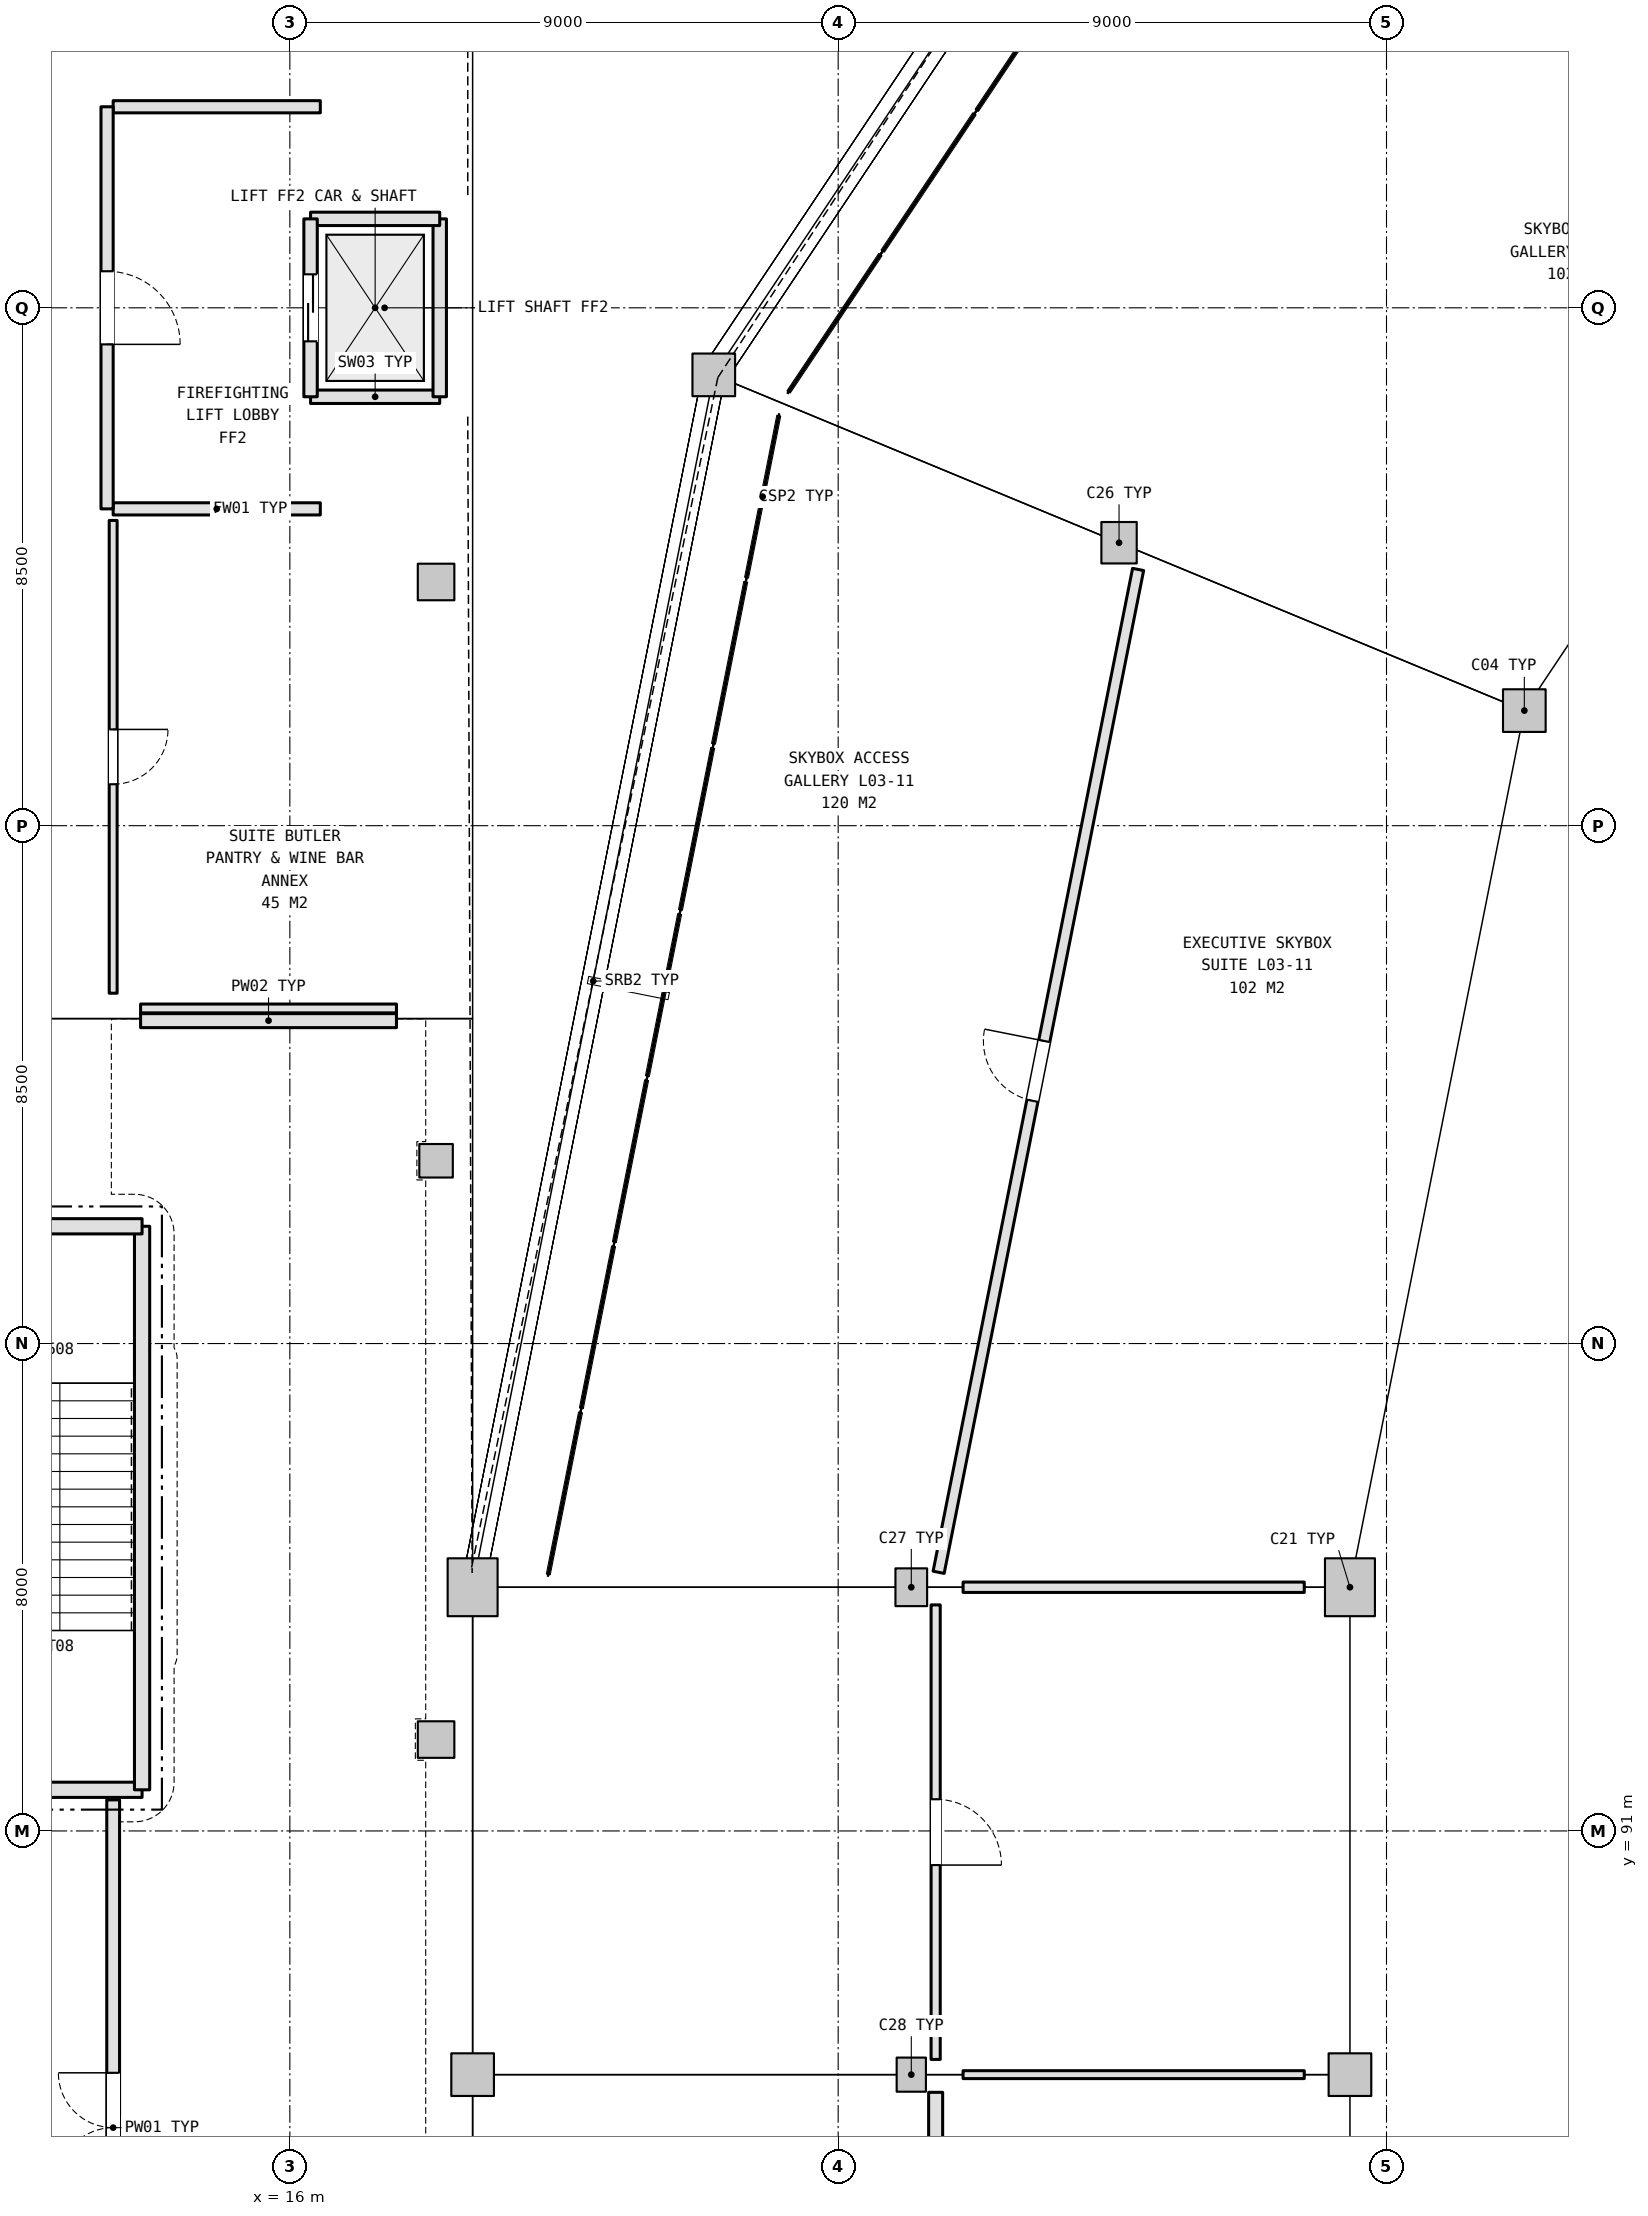
"""IFC4 building model, lengths in metres.
Left out: names, types, materials, properties, quantities, classifications, styles, units other than length and angle.
Written with IfcOpenShell. Run it as: python <this file> out.ifc"""

import sys

from ifc_helpers import new_model, si_unit, direction, frame, frame_2d, origin, origin_2d, place, context, subcontext, project, spatial, rectangle, extrude, element, fill, save


model = new_model("IFC4")
c1 = context("Model", 3, precision=1e-05, world=origin(), true_north=direction((0.0, 1.0)))
c2 = subcontext(c1, "Body", "Model", "MODEL_VIEW")
j1 = project(units=[si_unit("LENGTHUNIT", "METRE"), si_unit("PLANEANGLEUNIT", "RADIAN")], contexts=[c1])
p1 = place(None, origin())
s1 = spatial("IfcSite", under=j1, at=p1, CompositionType="ELEMENT")
p2 = place(p1, origin())
s2 = spatial("IfcBuilding", under=s1, at=p2, CompositionType="ELEMENT")
p3 = place(p2, frame((0.0, 0.0, 16.2)))
s3 = spatial("IfcBuildingStorey", under=s2, at=p3, CompositionType="ELEMENT", Elevation=16.2)
p4 = place(p3, frame((36.262, 109.389, 0.0), z_axis=(0.0, 0.0, 1.0), x_axis=(1.0, 0.0, 0.0)))
e1 = element("IfcColumn", 1, at=p4, inside=s3, PredefinedType="COLUMN", context=c2, shape_type="SweptSolid", body=[
    extrude(rectangle(XDim=0.7, YDim=0.7, at=origin_2d()), origin(), (0.0, 0.0, 1.0), 5.4),
])
p5 = place(p3, frame((29.61, 112.144, 0.0), z_axis=(0.0, 0.0, 1.0), x_axis=(1.0, 0.0, 0.0)))
e2 = element("IfcColumn", 2, at=p5, inside=s3, PredefinedType="COLUMN", context=c2, shape_type="SweptSolid", body=[
    extrude(rectangle(XDim=0.58, YDim=0.68, at=origin_2d()), origin(), (0.0, 0.0, 1.0), 5.4),
])
p6 = place(p3, frame((22.958, 114.9, 0.0), z_axis=(0.0, 0.0, 1.0), x_axis=(1.0, 0.0, 0.0)))
e3 = element("IfcColumn", 3, at=p6, inside=s3, PredefinedType="COLUMN", context=c2, shape_type="SweptSolid", body=[
    extrude(rectangle(XDim=0.7, YDim=0.7, at=origin_2d()), origin(), (0.0, 0.0, 1.0), 5.4),
])
p7 = place(p3, frame((33.4, 95.0, 0.0), z_axis=(0.0, 0.0, 1.0), x_axis=(1.0, 0.0, 0.0)))
e4 = element("IfcColumn", 4, at=p7, inside=s3, PredefinedType="COLUMN", context=c2, shape_type="SweptSolid", body=[
    extrude(rectangle(XDim=0.82, YDim=0.95, at=origin_2d()), origin(), (0.0, 0.0, 1.0), 5.4),
])
p8 = place(p3, frame((26.2, 95.0, 0.0), z_axis=(0.0, 0.0, 1.0), x_axis=(1.0, 0.0, 0.0)))
e5 = element("IfcColumn", 5, at=p8, inside=s3, PredefinedType="COLUMN", context=c2, shape_type="SweptSolid", body=[
    extrude(rectangle(XDim=0.52, YDim=0.62, at=origin_2d()), origin(), (0.0, 0.0, 1.0), 5.4),
])
p9 = place(p3, frame((19.0, 95.0, 0.0), z_axis=(0.0, 0.0, 1.0), x_axis=(1.0, 0.0, 0.0)))
e6 = element("IfcColumn", 6, at=p9, inside=s3, PredefinedType="COLUMN", context=c2, shape_type="SweptSolid", body=[
    extrude(rectangle(XDim=0.82, YDim=0.95, at=origin_2d()), origin(), (0.0, 0.0, 1.0), 5.4),
])
p10 = place(p3, frame((33.4, 87.0, 0.0), z_axis=(0.0, 0.0, 1.0), x_axis=(1.0, 0.0, 0.0)))
e7 = element("IfcColumn", 7, at=p10, inside=s3, PredefinedType="COLUMN", context=c2, shape_type="SweptSolid", body=[
    extrude(rectangle(XDim=0.7, YDim=0.7, at=origin_2d()), origin(), (0.0, 0.0, 1.0), 5.4),
])
p11 = place(p3, frame((26.2, 87.0, 0.0), z_axis=(0.0, 0.0, 1.0), x_axis=(1.0, 0.0, 0.0)))
e8 = element("IfcColumn", 8, at=p11, inside=s3, PredefinedType="COLUMN", context=c2, shape_type="SweptSolid", body=[
    extrude(rectangle(XDim=0.48, YDim=0.56, at=origin_2d()), origin(), (0.0, 0.0, 1.0), 5.4),
])
p12 = place(p3, frame((19.0, 87.0, 0.0), z_axis=(0.0, 0.0, 1.0), x_axis=(1.0, 0.0, 0.0)))
e9 = element("IfcColumn", 9, at=p12, inside=s3, PredefinedType="COLUMN", context=c2, shape_type="SweptSolid", body=[
    extrude(rectangle(XDim=0.7, YDim=0.7, at=origin_2d()), origin(), (0.0, 0.0, 1.0), 5.4),
])
p13 = place(p3, frame((18.4, 92.5, 0.0), z_axis=(0.0, 0.0, 1.0), x_axis=(1.0, 0.0, 0.0)))
e10 = element("IfcColumn", 10, at=p13, inside=s3, PredefinedType="COLUMN", context=c2, shape_type="SweptSolid", body=[
    extrude(rectangle(XDim=0.6, YDim=0.6, at=origin_2d()), origin(), (0.0, 0.0, 1.0), 5.4),
])
p14 = place(p3, frame((18.4, 102.0, 0.0), z_axis=(0.0, 0.0, 1.0), x_axis=(1.0, 0.0, 0.0)))
e11 = element("IfcColumn", 11, at=p14, inside=s3, PredefinedType="COLUMN", context=c2, shape_type="SweptSolid", body=[
    extrude(rectangle(XDim=0.55, YDim=0.55, at=origin_2d()), origin(), (0.0, 0.0, 1.0), 5.4),
])
p15 = place(p3, frame((18.4, 111.5, 0.0), z_axis=(0.0, 0.0, 1.0), x_axis=(1.0, 0.0, 0.0)))
e12 = element("IfcColumn", 12, at=p15, inside=s3, PredefinedType="COLUMN", context=c2, shape_type="SweptSolid", body=[
    extrude(rectangle(XDim=0.6, YDim=0.6, at=origin_2d()), origin(), (0.0, 0.0, 1.0), 5.4),
])
p16 = place(p3, frame((8.275, 91.675, 0.0), z_axis=(0.0, 0.0, 1.0), x_axis=(1.0, 0.0, 0.0)))
e13 = element("IfcWall", 13, at=p16, inside=s3, PredefinedType="SHEAR", context=c2, shape_type="SweptSolid", body=[
    extrude(rectangle(XDim=5.299, YDim=0.25, at=frame_2d((2.65, 0.0))), origin(), (0.0, 0.0, 1.0), 5.14),
])
p17 = place(p3, frame((13.575, 91.675, 0.0), z_axis=(0.0, 0.0, 1.0), x_axis=(0.0, 1.0, 0.0)))
e14 = element("IfcWall", 14, at=p17, inside=s3, PredefinedType="SHEAR", context=c2, shape_type="SweptSolid", body=[
    extrude(rectangle(XDim=9.249, YDim=0.25, at=frame_2d((4.625, 0.0))), origin(), (0.0, 0.0, 1.0), 5.14),
])
p18 = place(p3, frame((13.575, 100.925, 0.0), z_axis=(0.0, 0.0, 1.0), x_axis=(-1.0, 0.0, 0.0)))
e15 = element("IfcWall", 15, at=p18, inside=s3, PredefinedType="SHEAR", context=c2, shape_type="SweptSolid", body=[
    extrude(rectangle(XDim=5.299, YDim=0.25, at=frame_2d((2.65, 0.0))), origin(), (0.0, 0.0, 1.0), 5.14),
])
p19 = place(p18, frame((1.9, 0.0, 0.0)))
e16 = element("IfcOpeningElement", 16, at=p19, cuts=e15, PredefinedType="OPENING", context=c2, shape_type="SweptSolid", body=[
    extrude(rectangle(XDim=1.5, YDim=2.2, at=frame_2d((0.75, 1.1))), frame((0.0, 0.135, 0.0), z_axis=(0.0, -1.0, 0.0), x_axis=(1.0, 0.0, 0.0)), (0.0, 0.0, 1.0), 0.27),
])
p20 = place(p3, frame((16.34, 114.54, 0.0), z_axis=(0.0, 0.0, 1.0), x_axis=(1.0, 0.0, 0.0)))
e17 = element("IfcWall", 17, at=p20, inside=s3, PredefinedType="SHEAR", context=c2, shape_type="SweptSolid", body=[
    extrude(rectangle(XDim=2.12, YDim=0.22, at=frame_2d((1.06, 0.0))), origin(), (0.0, 0.0, 1.0), 5.14),
])
p21 = place(p3, frame((18.46, 114.54, 0.0), z_axis=(0.0, 0.0, 1.0), x_axis=(0.0, 1.0, 0.0)))
e18 = element("IfcWall", 18, at=p21, inside=s3, PredefinedType="SHEAR", context=c2, shape_type="SweptSolid", body=[
    extrude(rectangle(XDim=2.92, YDim=0.22, at=frame_2d((1.46, 0.0))), origin(), (0.0, 0.0, 1.0), 5.14),
])
p22 = place(p3, frame((18.46, 117.46, 0.0), z_axis=(0.0, 0.0, 1.0), x_axis=(-1.0, 0.0, 0.0)))
e19 = element("IfcWall", 19, at=p22, inside=s3, PredefinedType="SHEAR", context=c2, shape_type="SweptSolid", body=[
    extrude(rectangle(XDim=2.12, YDim=0.22, at=frame_2d((1.06, 0.0))), origin(), (0.0, 0.0, 1.0), 5.14),
])
p23 = place(p3, frame((16.34, 117.46, 0.0), z_axis=(0.0, 0.0, 1.0), x_axis=(0.0, -1.0, 0.0)))
e20 = element("IfcWall", 20, at=p23, inside=s3, PredefinedType="SHEAR", context=c2, shape_type="SweptSolid", body=[
    extrude(rectangle(XDim=2.92, YDim=0.22, at=frame_2d((1.46, 0.0))), origin(), (0.0, 0.0, 1.0), 5.14),
])
p24 = place(p23, frame((0.91, 0.0, 0.0)))
e21 = element("IfcOpeningElement", 21, at=p24, cuts=e20, PredefinedType="OPENING", context=c2, shape_type="SweptSolid", body=[
    extrude(rectangle(XDim=1.1, YDim=2.2, at=frame_2d((0.55, 1.1))), frame((0.0, 0.12, 0.0), z_axis=(0.0, -1.0, 0.0), x_axis=(1.0, 0.0, 0.0)), (0.0, 0.0, 1.0), 0.24),
])
for number, where, z_axis, x_axis in (
    (22, (13.1, 112.7, 0.0), (0.0, 0.0, 1.0), (1.0, 0.0, 0.0)),
    (23, (16.5, 119.3, 0.0), (0.0, 0.0, 1.0), (-1.0, 0.0, 0.0)),
):
    element("IfcWall", number, at=place(p3, frame(where, z_axis=z_axis, x_axis=x_axis)), inside=s3, PredefinedType="SOLIDWALL", context=c2, shape_type="SweptSolid", body=[
        extrude(rectangle(XDim=3.4, YDim=0.2, at=frame_2d((1.7, 0.0))), origin(), (0.0, 0.0, 1.0), 5.12),
    ])
p25 = place(p3, frame((13.0, 119.3, 0.0), z_axis=(0.0, 0.0, 1.0), x_axis=(0.0, -1.0, 0.0)))
e24 = element("IfcWall", 24, at=p25, inside=s3, PredefinedType="SOLIDWALL", context=c2, shape_type="SweptSolid", body=[
    extrude(rectangle(XDim=6.6, YDim=0.2, at=frame_2d((3.3, 0.0))), origin(), (0.0, 0.0, 1.0), 5.12),
])
p26 = place(p25, frame((2.7, 0.0, 0.0)))
e25 = element("IfcOpeningElement", 25, at=p26, cuts=e24, PredefinedType="OPENING", context=c2, shape_type="SweptSolid", body=[
    extrude(rectangle(XDim=1.2, YDim=2.2, at=frame_2d((0.6, 1.1))), frame((0.0, 0.11, 0.0), z_axis=(0.0, -1.0, 0.0), x_axis=(1.0, 0.0, 0.0)), (0.0, 0.0, 1.0), 0.22),
])
p27 = place(p3, frame((13.1, 80.75, 0.0), z_axis=(0.0, 0.0, 1.0), x_axis=(0.0, 1.0, 0.0)))
e26 = element("IfcWall", 26, at=p27, inside=s3, PredefinedType="PLUMBINGWALL", context=c2, shape_type="SweptSolid", body=[
    extrude(rectangle(XDim=10.76, YDim=0.21, at=frame_2d((5.38, 0.0))), origin(), (0.0, 0.0, 1.0), 4.668),
])
p28 = place(p27, frame((4.48, 0.0, 0.0)))
e27 = element("IfcOpeningElement", 27, at=p28, cuts=e26, PredefinedType="OPENING", context=c2, shape_type="SweptSolid", body=[
    extrude(rectangle(XDim=1.8, YDim=2.2, at=frame_2d((0.9, 1.1))), frame((0.0, 0.115, 0.0), z_axis=(0.0, -1.0, 0.0), x_axis=(1.0, 0.0, 0.0)), (0.0, 0.0, 1.0), 0.23),
])
p29 = place(p3, frame((13.55, 104.3, 0.0), z_axis=(0.0, 0.0, 1.0), x_axis=(1.0, 0.0, 0.0)))
e28 = element("IfcWall", 28, at=p29, inside=s3, PredefinedType="PLUMBINGWALL", context=c2, shape_type="SweptSolid", body=[
    extrude(rectangle(XDim=4.2, YDim=0.23, at=frame_2d((2.1, 0.0))), origin(), (0.0, 0.0, 1.0), 5.12),
])
p30 = place(p3, frame((13.1, 104.75, 0.0), z_axis=(0.0, 0.0, 1.0), x_axis=(0.0, 1.0, 0.0)))
e29 = element("IfcWall", 29, at=p30, inside=s3, PredefinedType="PARTITIONING", context=c2, shape_type="SweptSolid", body=[
    extrude(rectangle(XDim=7.76, YDim=0.13, at=frame_2d((3.88, 0.0))), origin(), (0.0, 0.0, 1.0), 4.668),
])
p31 = place(p30, frame((3.43, 0.0, 0.0)))
e30 = element("IfcOpeningElement", 30, at=p31, cuts=e29, PredefinedType="OPENING", context=c2, shape_type="SweptSolid", body=[
    extrude(rectangle(XDim=0.9, YDim=2.1, at=frame_2d((0.45, 1.05))), frame((0.0, 0.075, 0.0), z_axis=(0.0, -1.0, 0.0), x_axis=(1.0, 0.0, 0.0)), (0.0, 0.0, 1.0), 0.15),
])
p32 = place(p3, frame((17.75, 104.5, 0.0), z_axis=(0.0, 0.0, 1.0), x_axis=(-1.0, 0.0, 0.0)))
e31 = element("IfcWall", 31, at=p32, inside=s3, PredefinedType="PARTITIONING", context=c2, shape_type="SweptSolid", body=[
    extrude(rectangle(XDim=4.2, YDim=0.145, at=frame_2d((2.1, 0.0))), origin(), (0.0, 0.0, 1.0), 5.12),
])
p33 = place(p3, frame((26.649, 95.245, 0.0), z_axis=(0.0, 0.0, 1.0), x_axis=(0.195100557291, 0.980783244425, 0.0)))
e32 = element("IfcWall", 32, at=p33, inside=s3, PredefinedType="PARTITIONING", context=c2, shape_type="SweptSolid", body=[
    extrude(rectangle(XDim=16.783, YDim=0.185, at=frame_2d((8.392, 0.0))), origin(), (0.0, 0.0, 1.0), 4.305),
])
p34 = place(p33, frame((7.892, 0.0, 0.0)))
e33 = element("IfcOpeningElement", 33, at=p34, cuts=e32, PredefinedType="OPENING", context=c2, shape_type="SweptSolid", body=[
    extrude(rectangle(XDim=1.0, YDim=2.1, at=frame_2d((0.5, 1.05))), frame((0.0, 0.103, 0.0), z_axis=(0.0, -1.0, 0.0), x_axis=(1.0, 0.0, 0.0)), (0.0, 0.0, 1.0), 0.205),
])
p35 = place(p3, frame((32.65, 95.0, 0.0), z_axis=(0.0, 0.0, 1.0), x_axis=(-1.0, 0.0, 0.0)))
e34 = element("IfcWall", 34, at=p35, inside=s3, PredefinedType="PARTITIONING", context=c2, shape_type="SweptSolid", body=[
    extrude(rectangle(XDim=5.6, YDim=0.17, at=frame_2d((2.8, 0.0))), origin(), (0.0, 0.0, 1.0), 4.345),
])
p36 = place(p3, frame((26.6, 87.25, 0.0), z_axis=(0.0, 0.0, 1.0), x_axis=(0.0, 1.0, 0.0)))
e35 = element("IfcWall", 35, at=p36, inside=s3, PredefinedType="PARTITIONING", context=c2, shape_type="SweptSolid", body=[
    extrude(rectangle(XDim=7.46, YDim=0.15, at=frame_2d((3.73, 0.0))), origin(), (0.0, 0.0, 1.0), 4.345),
])
p37 = place(p36, frame((3.19, 0.0, 0.0)))
e36 = element("IfcOpeningElement", 36, at=p37, cuts=e35, PredefinedType="OPENING", context=c2, shape_type="SweptSolid", body=[
    extrude(rectangle(XDim=1.08, YDim=2.25, at=frame_2d((0.54, 1.125))), frame((0.0, 0.085, 0.0), z_axis=(0.0, -1.0, 0.0), x_axis=(1.0, 0.0, 0.0)), (0.0, 0.0, 1.0), 0.17),
])
p38 = place(p3, frame((32.65, 87.0, 0.0), z_axis=(0.0, 0.0, 1.0), x_axis=(-1.0, 0.0, 0.0)))
e37 = element("IfcWall", 37, at=p38, inside=s3, PredefinedType="PARTITIONING", context=c2, shape_type="SweptSolid", body=[
    extrude(rectangle(XDim=5.6, YDim=0.13, at=frame_2d((2.8, 0.0))), origin(), (0.0, 0.0, 1.0), 4.375),
])
p39 = place(p3, frame((26.6, 79.25, 0.0), z_axis=(0.0, 0.0, 1.0), x_axis=(0.0, 1.0, 0.0)))
e38 = element("IfcWall", 38, at=p39, inside=s3, PredefinedType="PLUMBINGWALL", context=c2, shape_type="SweptSolid", body=[
    extrude(rectangle(XDim=7.46, YDim=0.23, at=frame_2d((3.73, 0.0))), origin(), (0.0, 0.0, 1.0), 4.375),
])
p40 = place(p39, frame((3.24, 0.0, 0.0)))
e39 = element("IfcOpeningElement", 39, at=p40, cuts=e38, PredefinedType="OPENING", context=c2, shape_type="SweptSolid", body=[
    extrude(rectangle(XDim=0.98, YDim=2.15, at=frame_2d((0.49, 1.075))), frame((0.0, 0.125, 0.0), z_axis=(0.0, -1.0, 0.0), x_axis=(1.0, 0.0, 0.0)), (0.0, 0.0, 1.0), 0.25),
])
p41 = place(p24, origin())
e40 = element("IfcDoor", 40, at=p41, inside=s3, OperationType="DOUBLE_DOOR_SLIDING", PredefinedType="DOOR", context=c2, shape_type="SweptSolid", body=[
    extrude(rectangle(XDim=1.1, YDim=2.2, at=frame_2d((0.55, 1.1))), frame((0.0, 0.025, 0.0), z_axis=(0.0, -1.0, 0.0), x_axis=(1.0, 0.0, 0.0)), (0.0, 0.0, 1.0), 0.05),
])
fill(e21, e40)
p42 = place(p26, origin())
e41 = element("IfcDoor", 41, at=p42, inside=s3, OperationType="SINGLE_SWING_RIGHT", PredefinedType="DOOR", context=c2, shape_type="SweptSolid", body=[
    extrude(rectangle(XDim=1.2, YDim=2.2, at=frame_2d((0.6, 1.1))), frame((0.0, 0.025, 0.0), z_axis=(0.0, -1.0, 0.0), x_axis=(1.0, 0.0, 0.0)), (0.0, 0.0, 1.0), 0.05),
])
fill(e25, e41)
p43 = place(p28, origin())
e42 = element("IfcDoor", 42, at=p43, inside=s3, OperationType="DOUBLE_DOOR_SINGLE_SWING", PredefinedType="DOOR", context=c2, shape_type="SweptSolid", body=[
    extrude(rectangle(XDim=1.8, YDim=2.2, at=frame_2d((0.9, 1.1))), frame((0.0, 0.025, 0.0), z_axis=(0.0, -1.0, 0.0), x_axis=(1.0, 0.0, 0.0)), (0.0, 0.0, 1.0), 0.05),
])
fill(e27, e42)
p44 = place(p31, frame((0.9, 0.0, 0.0), z_axis=(0.0, 0.0, 1.0), x_axis=(-1.0, 0.0, 0.0)))
e43 = element("IfcDoor", 43, at=p44, inside=s3, OperationType="SINGLE_SWING_RIGHT", PredefinedType="DOOR", context=c2, shape_type="SweptSolid", body=[
    extrude(rectangle(XDim=0.9, YDim=2.1, at=frame_2d((0.45, 1.05))), frame((0.0, 0.025, 0.0), z_axis=(0.0, -1.0, 0.0), x_axis=(1.0, 0.0, 0.0)), (0.0, 0.0, 1.0), 0.05),
])
fill(e30, e43)
p45 = place(p34, origin())
e44 = element("IfcDoor", 44, at=p45, inside=s3, OperationType="SINGLE_SWING_RIGHT", PredefinedType="DOOR", context=c2, shape_type="SweptSolid", body=[
    extrude(rectangle(XDim=1.0, YDim=2.1, at=frame_2d((0.5, 1.05))), frame((0.0, 0.025, 0.0), z_axis=(0.0, -1.0, 0.0), x_axis=(1.0, 0.0, 0.0)), (0.0, 0.0, 1.0), 0.05),
])
fill(e33, e44)
p46 = place(p37, frame((1.08, 0.0, 0.0), z_axis=(0.0, 0.0, 1.0), x_axis=(-1.0, 0.0, 0.0)))
e45 = element("IfcDoor", 45, at=p46, inside=s3, OperationType="SINGLE_SWING_LEFT", PredefinedType="DOOR", context=c2, shape_type="SweptSolid", body=[
    extrude(rectangle(XDim=1.08, YDim=2.25, at=frame_2d((0.54, 1.125))), frame((0.0, 0.025, 0.0), z_axis=(0.0, -1.0, 0.0), x_axis=(1.0, 0.0, 0.0)), (0.0, 0.0, 1.0), 0.05),
])
fill(e36, e45)
save(model, sys.argv[1])
